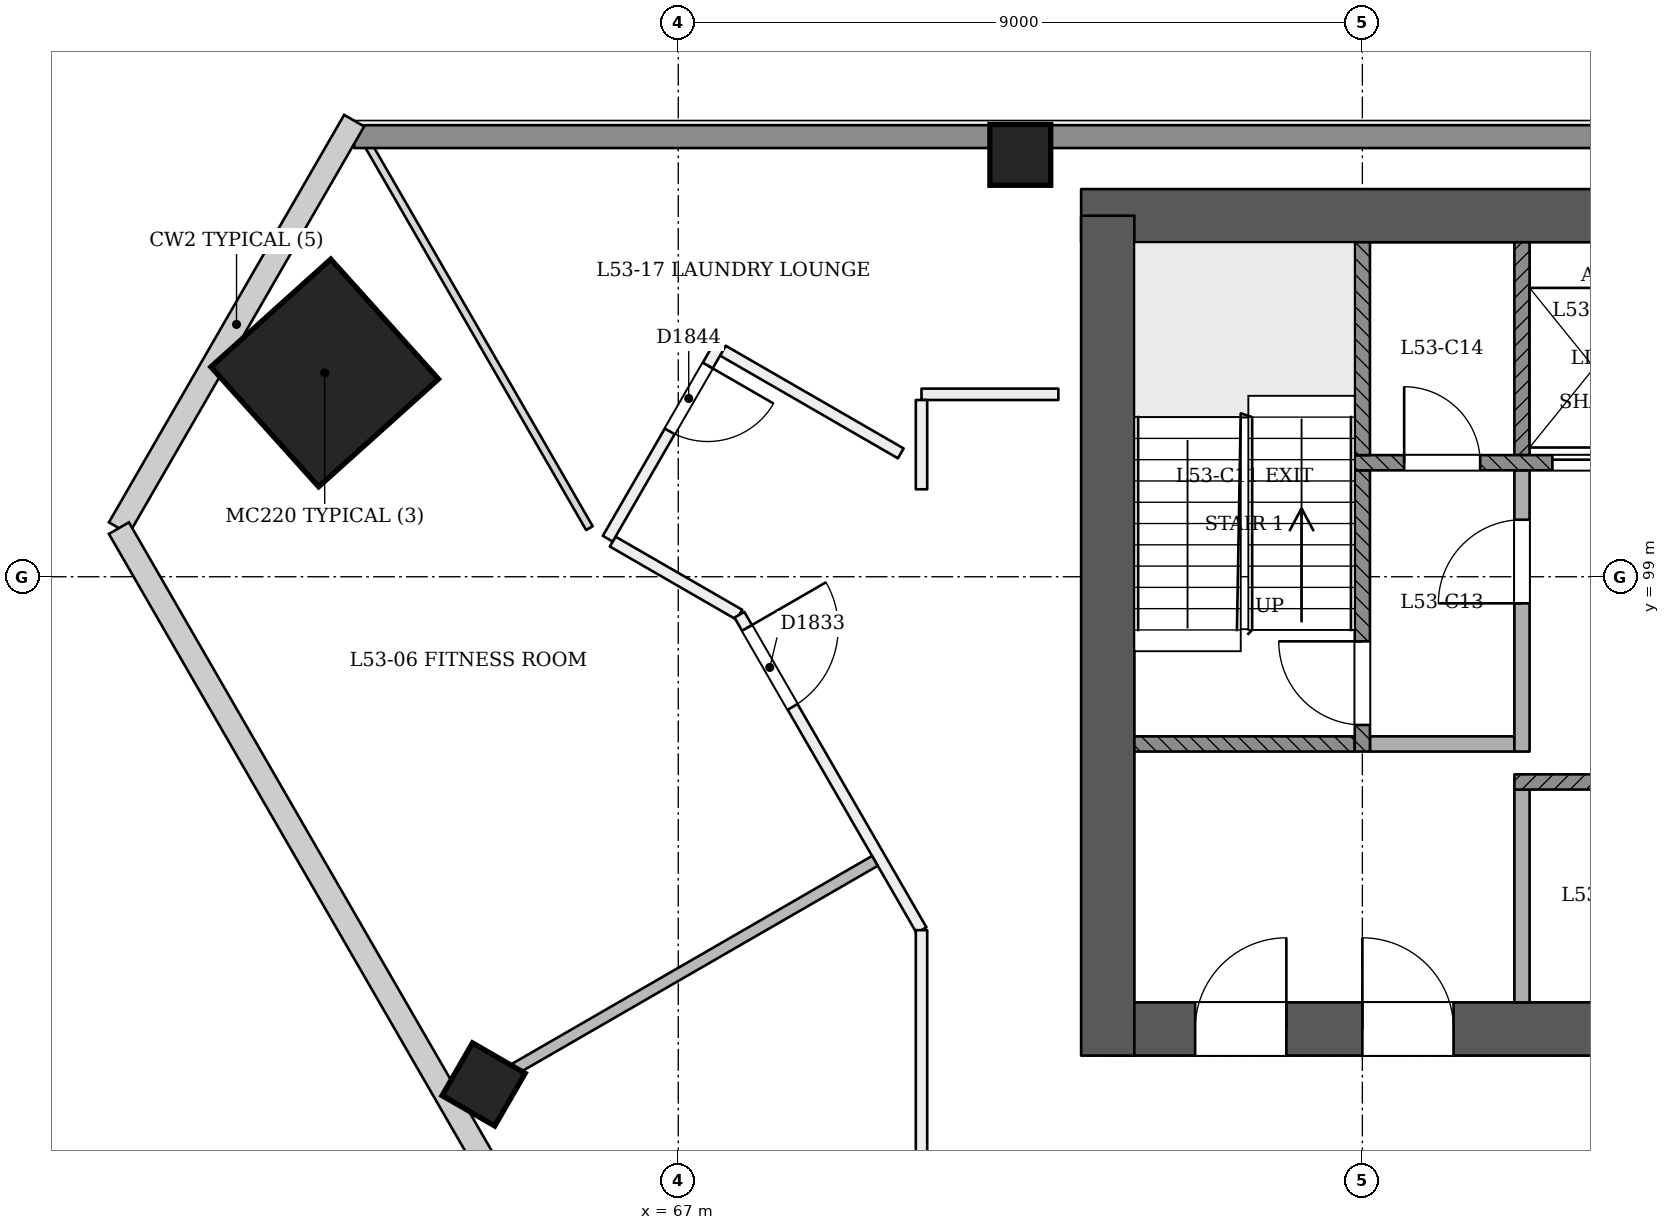
"""IFC4 building model, lengths in metres.
Left out: names, types, materials, properties, quantities, classifications, styles, units other than length and angle.
Written with IfcOpenShell. Run it as: python <this file> out.ifc"""

import sys

from ifc_helpers import new_model, si_unit, direction, frame, frame_2d, origin, origin_2d, place, context, subcontext, project, spatial, rectangle, extrude, element, fill, save


model = new_model("IFC4")
c1 = context("Model", 3, precision=1e-05, world=origin(), true_north=direction((0.0, 1.0)))
c2 = subcontext(c1, "Body", "Model", "MODEL_VIEW")
j1 = project(units=[si_unit("LENGTHUNIT", "METRE"), si_unit("PLANEANGLEUNIT", "RADIAN")], contexts=[c1])
p1 = place(None, origin())
s1 = spatial("IfcSite", under=j1, at=p1, CompositionType="ELEMENT")
p2 = place(p1, origin())
s2 = spatial("IfcBuilding", under=s1, at=p2, CompositionType="ELEMENT")
p3 = place(p2, frame((0.0, 0.0, 205.2)))
s3 = spatial("IfcBuildingStorey", under=s2, at=p3, CompositionType="ELEMENT", Elevation=205.2)
p4 = place(p3, frame((72.65, 93.05, 0.0), z_axis=(0.0, 0.0, 1.0), x_axis=(1.0, 0.0, 0.0)))
e1 = element("IfcWall", 1, at=p4, inside=s3, PredefinedType="SHEAR", context=c2, shape_type="SweptSolid", body=[
    extrude(rectangle(XDim=25.05, YDim=0.7, at=frame_2d((12.525, 0.0))), origin(), (0.0, 0.0, 1.0), 3.6),
])
p5 = place(p4, frame((1.15, 0.0, 0.0)))
e2 = element("IfcOpeningElement", 2, at=p5, cuts=e1, PredefinedType="OPENING", context=c2, shape_type="SweptSolid", body=[
    extrude(rectangle(XDim=1.2, YDim=2.1, at=frame_2d((0.6, 1.05))), frame((0.0, 0.36, 0.0), z_axis=(0.0, -1.0, 0.0), x_axis=(1.0, 0.0, 0.0)), (0.0, 0.0, 1.0), 0.721),
])
p6 = place(p4, frame((3.35, 0.0, 0.0)))
e3 = element("IfcOpeningElement", 3, at=p6, cuts=e1, PredefinedType="OPENING", context=c2, shape_type="SweptSolid", body=[
    extrude(rectangle(XDim=1.2, YDim=2.1, at=frame_2d((0.6, 1.05))), frame((0.0, 0.36, 0.0), z_axis=(0.0, -1.0, 0.0), x_axis=(1.0, 0.0, 0.0)), (0.0, 0.0, 1.0), 0.721),
])
p7 = place(p4, frame((13.35, 0.0, 0.0)))
e4 = element("IfcOpeningElement", 4, at=p7, cuts=e1, PredefinedType="OPENING", context=c2, shape_type="SweptSolid", body=[
    extrude(rectangle(XDim=1.2, YDim=2.1, at=frame_2d((0.6, 1.05))), frame((0.0, 0.36, 0.0), z_axis=(0.0, -1.0, 0.0), x_axis=(1.0, 0.0, 0.0)), (0.0, 0.0, 1.0), 0.721),
])
p8 = place(p4, frame((15.812, 0.0, 0.0)))
e5 = element("IfcOpeningElement", 5, at=p8, cuts=e1, PredefinedType="OPENING", context=c2, shape_type="SweptSolid", body=[
    extrude(rectangle(XDim=1.0, YDim=2.1, at=frame_2d((0.5, 1.05))), frame((0.0, 0.36, 0.0), z_axis=(0.0, -1.0, 0.0), x_axis=(1.0, 0.0, 0.0)), (0.0, 0.0, 1.0), 0.721),
])
p9 = place(p4, frame((18.25, 0.0, 0.0)))
e6 = element("IfcOpeningElement", 6, at=p9, cuts=e1, PredefinedType="OPENING", context=c2, shape_type="SweptSolid", body=[
    extrude(rectangle(XDim=1.0, YDim=2.1, at=frame_2d((0.5, 1.05))), frame((0.0, 0.36, 0.0), z_axis=(0.0, -1.0, 0.0), x_axis=(1.0, 0.0, 0.0)), (0.0, 0.0, 1.0), 0.721),
])
p10 = place(p4, frame((20.6, 0.0, 0.0)))
e7 = element("IfcOpeningElement", 7, at=p10, cuts=e1, PredefinedType="OPENING", context=c2, shape_type="SweptSolid", body=[
    extrude(rectangle(XDim=1.0, YDim=2.1, at=frame_2d((0.5, 1.05))), frame((0.0, 0.36, 0.0), z_axis=(0.0, -1.0, 0.0), x_axis=(1.0, 0.0, 0.0)), (0.0, 0.0, 1.0), 0.721),
])
p11 = place(p4, frame((22.887, 0.0, 0.0)))
e8 = element("IfcOpeningElement", 8, at=p11, cuts=e1, PredefinedType="OPENING", context=c2, shape_type="SweptSolid", body=[
    extrude(rectangle(XDim=1.0, YDim=2.1, at=frame_2d((0.5, 1.05))), frame((0.0, 0.36, 0.0), z_axis=(0.0, -1.0, 0.0), x_axis=(1.0, 0.0, 0.0)), (0.0, 0.0, 1.0), 0.721),
])
p12 = place(p3, frame((97.35, 103.75, 0.0), z_axis=(0.0, 0.0, 1.0), x_axis=(-1.0, 0.0, 0.0)))
e9 = element("IfcWall", 9, at=p12, inside=s3, PredefinedType="SHEAR", context=c2, shape_type="SweptSolid", body=[
    extrude(rectangle(XDim=25.05, YDim=0.7, at=frame_2d((12.525, 0.0))), origin(), (0.0, 0.0, 1.0), 3.6),
])
p13 = place(p3, frame((72.65, 103.75, 0.0), z_axis=(0.0, 0.0, 1.0), x_axis=(0.0, -1.0, 0.0)))
e10 = element("IfcWall", 10, at=p13, inside=s3, PredefinedType="SHEAR", context=c2, shape_type="SweptSolid", body=[
    extrude(rectangle(XDim=11.05, YDim=0.7, at=frame_2d((5.525, 0.0))), origin(), (0.0, 0.0, 1.0), 3.6),
])
p14 = place(p3, frame((62.314, 101.67, 0.0), z_axis=(0.028401814599, 0.009218727412, 0.999554076572), x_axis=(-0.865120088362, 0.501167477907, 0.019959754512)))
e11 = element("IfcColumn", 11, at=p14, inside=s3, PredefinedType="COLUMN", context=c2, shape_type="SweptSolid", body=[
    extrude(rectangle(XDim=2.12, YDim=2.12, at=origin_2d()), origin(), (0.0, 0.0, 1.0), 3.602),
])
p15 = place(p3, frame((71.5, 104.55, 0.0), z_axis=(0.0, 0.0, 1.0), x_axis=(1.0, 0.0, 0.0)))
e12 = element("IfcColumn", 12, at=p15, inside=s3, PredefinedType="COLUMN", context=c2, shape_type="SweptSolid", body=[
    extrude(rectangle(XDim=0.8, YDim=0.8, at=origin_2d()), origin(), (0.0, 0.0, 1.0), 3.6),
])
p16 = place(p3, frame((64.412, 92.273, -0.024), z_axis=(0.022222852987, 0.038483477124, 0.999012095419), x_axis=(-0.865636672078, -0.499191360046, 0.038485555846)))
e13 = element("IfcColumn", 13, at=p16, inside=s3, PredefinedType="COLUMN", context=c2, shape_type="SweptSolid", body=[
    extrude(rectangle(XDim=0.8, YDim=0.8, at=origin_2d()), origin(), (0.0, 0.0, 1.0), 3.604),
])
p17 = place(p3, frame((66.137, 99.462, 0.0), z_axis=(0.0, 0.0, 1.0), x_axis=(0.866033512162, -0.499985955615, 0.0)))
e14 = element("IfcWall", 14, at=p17, inside=s3, PredefinedType="PARTITIONING", context=c2, shape_type="SweptSolid", body=[
    extrude(rectangle(XDim=1.925, YDim=0.15, at=frame_2d((0.962, 0.0))), origin(), (0.0, 0.0, 1.0), 3.15),
])
p18 = place(p3, frame((67.804, 98.5, 0.0), z_axis=(0.0, 0.0, 1.0), x_axis=(0.499991496398, -0.866030313286, 0.0)))
e15 = element("IfcWall", 15, at=p18, inside=s3, PredefinedType="PARTITIONING", context=c2, shape_type="SweptSolid", body=[
    extrude(rectangle(XDim=4.792, YDim=0.15, at=frame_2d((2.396, 0.0))), origin(), (0.0, 0.0, 1.0), 3.15),
])
p19 = place(p18, frame((0.2, 0.0, 0.0)))
e16 = element("IfcOpeningElement", 16, at=p19, cuts=e15, PredefinedType="OPENING", context=c2, shape_type="SweptSolid", body=[
    extrude(rectangle(XDim=1.2, YDim=2.1, at=frame_2d((0.6, 1.05))), frame((0.0, 0.085, 0.0), z_axis=(0.0, -1.0, 0.0), x_axis=(1.0, 0.0, 0.0)), (0.0, 0.0, 1.0), 0.171),
])
p20 = place(p3, frame((70.2, 94.35, 0.0), z_axis=(0.0, 0.0, 1.0), x_axis=(0.0, -1.0, 0.0)))
e17 = element("IfcWall", 17, at=p20, inside=s3, PredefinedType="PARTITIONING", context=c2, shape_type="SweptSolid", body=[
    extrude(rectangle(XDim=4.15, YDim=0.15, at=frame_2d((2.075, 0.0))), origin(), (0.0, 0.0, 1.0), 3.15),
])
p21 = place(p3, frame((72.0, 101.4, 0.0), z_axis=(0.0, 0.0, 1.0), x_axis=(-1.0, 0.0, 0.0)))
e18 = element("IfcWall", 18, at=p21, inside=s3, PredefinedType="PARTITIONING", context=c2, shape_type="SweptSolid", body=[
    extrude(rectangle(XDim=1.8, YDim=0.15, at=frame_2d((0.9, 0.0))), origin(), (0.0, 0.0, 1.0), 3.15),
])
p22 = place(p3, frame((70.2, 101.325, 0.0), z_axis=(0.0, 0.0, 1.0), x_axis=(0.0, -1.0, 0.0)))
e19 = element("IfcWall", 19, at=p22, inside=s3, PredefinedType="PARTITIONING", context=c2, shape_type="SweptSolid", body=[
    extrude(rectangle(XDim=1.175, YDim=0.15, at=frame_2d((0.587, 0.0))), origin(), (0.0, 0.0, 1.0), 3.15),
])
p23 = place(p3, frame((69.927, 100.623, 0.0), z_axis=(0.0, 0.0, 1.0), x_axis=(-0.866060705498, 0.499938850654, 0.0)))
e20 = element("IfcWall", 20, at=p23, inside=s3, PredefinedType="PARTITIONING", context=c2, shape_type="SweptSolid", body=[
    extrude(rectangle(XDim=2.702, YDim=0.15, at=frame_2d((1.351, 0.0))), origin(), (0.0, 0.0, 1.0), 3.15),
])
p24 = place(p3, frame((67.522, 102.011, 0.0), z_axis=(0.0, 0.0, 1.0), x_axis=(-0.499987231761, -0.866032775405, 0.0)))
e21 = element("IfcWall", 21, at=p24, inside=s3, PredefinedType="PARTITIONING", context=c2, shape_type="SweptSolid", body=[
    extrude(rectangle(XDim=2.9, YDim=0.15, at=frame_2d((1.45, 0.0))), origin(), (0.0, 0.0, 1.0), 3.15),
])
p25 = place(p24, frame((0.269, 0.0, 0.0)))
e22 = element("IfcOpeningElement", 22, at=p25, cuts=e21, PredefinedType="OPENING", context=c2, shape_type="SweptSolid", body=[
    extrude(rectangle(XDim=1.0, YDim=2.1, at=frame_2d((0.5, 1.05))), frame((0.0, 0.085, 0.0), z_axis=(0.0, -1.0, 0.0), x_axis=(1.0, 0.0, 0.0)), (0.0, 0.0, 1.0), 0.171),
])
p26 = place(p3, frame((64.11, 92.099, 0.0), z_axis=(0.0, 0.0, 1.0), x_axis=(0.866015887322, 0.500016482634, 0.0)))
e23 = element("IfcWall", 23, at=p26, inside=s3, PredefinedType="PARTITIONING", context=c2, shape_type="SweptSolid", body=[
    extrude(rectangle(XDim=6.325, YDim=0.15, at=frame_2d((3.163, 0.0))), origin(), (0.0, 0.0, 1.0), 2.65),
])
p27 = place(p3, frame((65.831, 99.639, 0.0), z_axis=(0.0, 0.0, 1.0), x_axis=(-0.499994988479, 0.866028297168, 0.0)))
e24 = element("IfcWall", 24, at=p27, inside=s3, PredefinedType="PARTITIONING", context=c2, shape_type="SweptSolid", body=[
    extrude(rectangle(XDim=6.074, YDim=0.1, at=frame_2d((3.037, 0.0))), origin(), (0.0, 0.0, 1.0), 2.65),
])
p28 = place(p3, frame((62.736, 104.79, 0.0), z_axis=(0.0, 0.0, 1.0), x_axis=(1.0, 0.0, 0.0)))
e25 = element("IfcWall", 25, at=p28, inside=s3, PredefinedType="SOLIDWALL", context=c2, shape_type="SweptSolid", body=[
    extrude(rectangle(XDim=44.528, YDim=0.3, at=frame_2d((22.264, 0.0))), origin(), (0.0, 0.0, 1.0), 2.65),
])
p29 = place(p3, frame((78.1, 93.4, 0.0), z_axis=(0.0, 0.0, 1.0), x_axis=(0.0, 1.0, 0.0)))
e26 = element("IfcWall", 26, at=p29, inside=s3, PredefinedType="PARTITIONING", context=c2, shape_type="SweptSolid", body=[
    extrude(rectangle(XDim=2.8, YDim=0.2, at=frame_2d((1.4, 0.0))), origin(), (0.0, 0.0, 1.0), 3.15),
])
p30 = place(p3, frame((78.0, 96.3, 0.0), z_axis=(0.0, 0.0, 1.0), x_axis=(1.0, 0.0, 0.0)))
e27 = element("IfcWall", 27, at=p30, inside=s3, PredefinedType="SOLIDWALL", context=c2, shape_type="SweptSolid", body=[
    extrude(rectangle(XDim=7.8, YDim=0.2, at=frame_2d((3.9, 0.0))), origin(), (0.0, 0.0, 1.0), 3.15),
])
p31 = place(p30, frame((1.5, 0.0, 0.0)))
e28 = element("IfcOpeningElement", 28, at=p31, cuts=e27, PredefinedType="OPENING", context=c2, shape_type="SweptSolid", body=[
    extrude(rectangle(XDim=1.0, YDim=2.1, at=frame_2d((0.5, 1.05))), frame((0.0, 0.11, 0.0), z_axis=(0.0, -1.0, 0.0), x_axis=(1.0, 0.0, 0.0)), (0.0, 0.0, 1.0), 0.221),
])
p32 = place(p3, frame((73.0, 96.8, 0.0), z_axis=(0.0, 0.0, 1.0), x_axis=(1.0, 0.0, 0.0)))
e29 = element("IfcWall", 29, at=p32, inside=s3, PredefinedType="SOLIDWALL", context=c2, shape_type="SweptSolid", body=[
    extrude(rectangle(XDim=2.9, YDim=0.2, at=frame_2d((1.45, 0.0))), origin(), (0.0, 0.0, 1.0), 3.15),
])
p33 = place(p3, frame((76.0, 96.7, 0.0), z_axis=(0.0, 0.0, 1.0), x_axis=(0.0, 1.0, 0.0)))
e30 = element("IfcWall", 30, at=p33, inside=s3, PredefinedType="SOLIDWALL", context=c2, shape_type="SweptSolid", body=[
    extrude(rectangle(XDim=3.7, YDim=0.2, at=frame_2d((1.85, 0.0))), origin(), (0.0, 0.0, 1.0), 3.15),
])
p34 = place(p33, frame((0.35, 0.0, 0.0)))
e31 = element("IfcOpeningElement", 31, at=p34, cuts=e30, PredefinedType="OPENING", context=c2, shape_type="SweptSolid", body=[
    extrude(rectangle(XDim=1.1, YDim=2.1, at=frame_2d((0.55, 1.05))), frame((0.0, 0.11, 0.0), z_axis=(0.0, -1.0, 0.0), x_axis=(1.0, 0.0, 0.0)), (0.0, 0.0, 1.0), 0.221),
])
p35 = place(p3, frame((76.1, 96.8, 0.0), z_axis=(0.0, 0.0, 1.0), x_axis=(1.0, 0.0, 0.0)))
e32 = element("IfcWall", 32, at=p35, inside=s3, PredefinedType="PARTITIONING", context=c2, shape_type="SweptSolid", body=[
    extrude(rectangle(XDim=1.9, YDim=0.2, at=frame_2d((0.95, 0.0))), origin(), (0.0, 0.0, 1.0), 3.15),
])
p36 = place(p3, frame((78.1, 96.7, 0.0), z_axis=(0.0, 0.0, 1.0), x_axis=(0.0, 1.0, 0.0)))
e33 = element("IfcWall", 33, at=p36, inside=s3, PredefinedType="PARTITIONING", context=c2, shape_type="SweptSolid", body=[
    extrude(rectangle(XDim=3.7, YDim=0.2, at=frame_2d((1.85, 0.0))), origin(), (0.0, 0.0, 1.0), 3.15),
])
p37 = place(p36, frame((1.95, 0.0, 0.0)))
e34 = element("IfcOpeningElement", 34, at=p37, cuts=e33, PredefinedType="OPENING", context=c2, shape_type="SweptSolid", body=[
    extrude(rectangle(XDim=1.1, YDim=2.1, at=frame_2d((0.55, 1.05))), frame((0.0, 0.11, 0.0), z_axis=(0.0, -1.0, 0.0), x_axis=(1.0, 0.0, 0.0)), (0.0, 0.0, 1.0), 0.221),
])
p38 = place(p3, frame((75.9, 100.5, 0.0), z_axis=(0.0, 0.0, 1.0), x_axis=(1.0, 0.0, 0.0)))
e35 = element("IfcWall", 35, at=p38, inside=s3, PredefinedType="SOLIDWALL", context=c2, shape_type="SweptSolid", body=[
    extrude(rectangle(XDim=18.2, YDim=0.2, at=frame_2d((9.1, 0.0))), origin(), (0.0, 0.0, 1.0), 3.15),
])
p39 = place(p38, frame((2.6, 0.0, 0.0)))
e36 = element("IfcOpeningElement", 36, at=p39, cuts=e35, PredefinedType="OPENING", context=c2, shape_type="SweptSolid", body=[
    extrude(rectangle(XDim=1.1, YDim=2.1, at=frame_2d((0.55, 1.05))), frame((0.0, 0.11, 0.0), z_axis=(0.0, -1.0, 0.0), x_axis=(1.0, 0.0, 0.0)), (0.0, 0.0, 1.0), 0.221),
])
p40 = place(p38, frame((4.5, 0.0, 0.0)))
e37 = element("IfcOpeningElement", 37, at=p40, cuts=e35, PredefinedType="OPENING", context=c2, shape_type="SweptSolid", body=[
    extrude(rectangle(XDim=1.1, YDim=2.1, at=frame_2d((0.55, 1.05))), frame((0.0, 0.11, 0.0), z_axis=(0.0, -1.0, 0.0), x_axis=(1.0, 0.0, 0.0)), (0.0, 0.0, 1.0), 0.221),
])
p41 = place(p38, frame((6.4, 0.0, 0.0)))
e38 = element("IfcOpeningElement", 38, at=p41, cuts=e35, PredefinedType="OPENING", context=c2, shape_type="SweptSolid", body=[
    extrude(rectangle(XDim=1.1, YDim=2.1, at=frame_2d((0.55, 1.05))), frame((0.0, 0.11, 0.0), z_axis=(0.0, -1.0, 0.0), x_axis=(1.0, 0.0, 0.0)), (0.0, 0.0, 1.0), 0.221),
])
p42 = place(p38, frame((8.3, 0.0, 0.0)))
e39 = element("IfcOpeningElement", 39, at=p42, cuts=e35, PredefinedType="OPENING", context=c2, shape_type="SweptSolid", body=[
    extrude(rectangle(XDim=1.1, YDim=2.1, at=frame_2d((0.55, 1.05))), frame((0.0, 0.11, 0.0), z_axis=(0.0, -1.0, 0.0), x_axis=(1.0, 0.0, 0.0)), (0.0, 0.0, 1.0), 0.221),
])
p43 = place(p38, frame((10.2, 0.0, 0.0)))
e40 = element("IfcOpeningElement", 40, at=p43, cuts=e35, PredefinedType="OPENING", context=c2, shape_type="SweptSolid", body=[
    extrude(rectangle(XDim=1.1, YDim=2.1, at=frame_2d((0.55, 1.05))), frame((0.0, 0.11, 0.0), z_axis=(0.0, -1.0, 0.0), x_axis=(1.0, 0.0, 0.0)), (0.0, 0.0, 1.0), 0.221),
])
p44 = place(p38, frame((12.1, 0.0, 0.0)))
e41 = element("IfcOpeningElement", 41, at=p44, cuts=e35, PredefinedType="OPENING", context=c2, shape_type="SweptSolid", body=[
    extrude(rectangle(XDim=1.1, YDim=2.1, at=frame_2d((0.55, 1.05))), frame((0.0, 0.11, 0.0), z_axis=(0.0, -1.0, 0.0), x_axis=(1.0, 0.0, 0.0)), (0.0, 0.0, 1.0), 0.221),
])
p45 = place(p38, frame((14.0, 0.0, 0.0)))
e42 = element("IfcOpeningElement", 42, at=p45, cuts=e35, PredefinedType="OPENING", context=c2, shape_type="SweptSolid", body=[
    extrude(rectangle(XDim=1.1, YDim=2.1, at=frame_2d((0.55, 1.05))), frame((0.0, 0.11, 0.0), z_axis=(0.0, -1.0, 0.0), x_axis=(1.0, 0.0, 0.0)), (0.0, 0.0, 1.0), 0.221),
])
p46 = place(p38, frame((0.65, 0.0, 0.0)))
e43 = element("IfcOpeningElement", 43, at=p46, cuts=e35, PredefinedType="OPENING", context=c2, shape_type="SweptSolid", body=[
    extrude(rectangle(XDim=1.0, YDim=2.1, at=frame_2d((0.5, 1.05))), frame((0.0, 0.11, 0.0), z_axis=(0.0, -1.0, 0.0), x_axis=(1.0, 0.0, 0.0)), (0.0, 0.0, 1.0), 0.221),
])
p47 = place(p38, frame((16.3, 0.0, 0.0)))
e44 = element("IfcOpeningElement", 44, at=p47, cuts=e35, PredefinedType="OPENING", context=c2, shape_type="SweptSolid", body=[
    extrude(rectangle(XDim=1.0, YDim=2.1, at=frame_2d((0.5, 1.05))), frame((0.0, 0.11, 0.0), z_axis=(0.0, -1.0, 0.0), x_axis=(1.0, 0.0, 0.0)), (0.0, 0.0, 1.0), 0.221),
])
for number, where, z_axis, x_axis in (
    (45, (76.0, 100.6, 0.0), (0.0, 0.0, 1.0), (0.0, 1.0, 0.0)),
    (46, (78.1, 100.6, 0.0), (0.0, 0.0, 1.0), (0.0, 1.0, 0.0)),
):
    element("IfcWall", number, at=place(p3, frame(where, z_axis=z_axis, x_axis=x_axis)), inside=s3, PredefinedType="SOLIDWALL", context=c2, shape_type="SweptSolid", body=[
        extrude(rectangle(XDim=2.8, YDim=0.2, at=frame_2d((1.4, 0.0))), origin(), (0.0, 0.0, 1.0), 3.15),
    ])
p48 = place(p19, origin())
e47 = element("IfcDoor", 47, at=p48, inside=s3, OperationType="SINGLE_SWING_LEFT", PredefinedType="NOTDEFINED", context=c2, shape_type="SweptSolid", body=[
    extrude(rectangle(XDim=1.2, YDim=2.1, at=frame_2d((0.6, 1.05))), frame((0.0, 0.025, 0.0), z_axis=(0.0, -1.0, 0.0), x_axis=(1.0, 0.0, 0.0)), (0.0, 0.0, 1.0), 0.05),
])
fill(e16, e47)
p49 = place(p25, origin())
e48 = element("IfcDoor", 48, at=p49, inside=s3, OperationType="SINGLE_SWING_LEFT", PredefinedType="NOTDEFINED", context=c2, shape_type="SweptSolid", body=[
    extrude(rectangle(XDim=1.0, YDim=2.1, at=frame_2d((0.5, 1.05))), frame((0.0, 0.025, 0.0), z_axis=(0.0, -1.0, 0.0), x_axis=(1.0, 0.0, 0.0)), (0.0, 0.0, 1.0), 0.05),
])
fill(e22, e48)
p50 = place(p39, origin())
e49 = element("IfcDoor", 49, at=p50, inside=s3, OperationType="SLIDING_TO_RIGHT", PredefinedType="NOTDEFINED", context=c2, shape_type="SweptSolid", body=[
    extrude(rectangle(XDim=1.1, YDim=2.1, at=frame_2d((0.55, 1.05))), frame((0.0, 0.025, 0.0), z_axis=(0.0, -1.0, 0.0), x_axis=(1.0, 0.0, 0.0)), (0.0, 0.0, 1.0), 0.05),
])
fill(e36, e49)
p51 = place(p34, origin())
e50 = element("IfcDoor", 50, at=p51, inside=s3, OperationType="SINGLE_SWING_RIGHT", PredefinedType="NOTDEFINED", context=c2, shape_type="SweptSolid", body=[
    extrude(rectangle(XDim=1.1, YDim=2.1, at=frame_2d((0.55, 1.05))), frame((0.0, 0.025, 0.0), z_axis=(0.0, -1.0, 0.0), x_axis=(1.0, 0.0, 0.0)), (0.0, 0.0, 1.0), 0.05),
])
fill(e31, e50)
p52 = place(p37, origin())
e51 = element("IfcDoor", 51, at=p52, inside=s3, OperationType="SINGLE_SWING_LEFT", PredefinedType="NOTDEFINED", context=c2, shape_type="SweptSolid", body=[
    extrude(rectangle(XDim=1.1, YDim=2.1, at=frame_2d((0.55, 1.05))), frame((0.0, 0.025, 0.0), z_axis=(0.0, -1.0, 0.0), x_axis=(1.0, 0.0, 0.0)), (0.0, 0.0, 1.0), 0.05),
])
fill(e34, e51)
p53 = place(p5, origin())
e52 = element("IfcDoor", 52, at=p53, inside=s3, OperationType="SINGLE_SWING_RIGHT", PredefinedType="NOTDEFINED", context=c2, shape_type="SweptSolid", body=[
    extrude(rectangle(XDim=1.2, YDim=2.1, at=frame_2d((0.6, 1.05))), frame((0.0, 0.025, 0.0), z_axis=(0.0, -1.0, 0.0), x_axis=(1.0, 0.0, 0.0)), (0.0, 0.0, 1.0), 0.05),
])
fill(e2, e52)
p54 = place(p6, origin())
e53 = element("IfcDoor", 53, at=p54, inside=s3, OperationType="SINGLE_SWING_LEFT", PredefinedType="NOTDEFINED", context=c2, shape_type="SweptSolid", body=[
    extrude(rectangle(XDim=1.2, YDim=2.1, at=frame_2d((0.6, 1.05))), frame((0.0, 0.025, 0.0), z_axis=(0.0, -1.0, 0.0), x_axis=(1.0, 0.0, 0.0)), (0.0, 0.0, 1.0), 0.05),
])
fill(e3, e53)
p55 = place(p46, origin())
e54 = element("IfcDoor", 54, at=p55, inside=s3, OperationType="SINGLE_SWING_LEFT", PredefinedType="NOTDEFINED", context=c2, shape_type="SweptSolid", body=[
    extrude(rectangle(XDim=1.0, YDim=2.1, at=frame_2d((0.5, 1.05))), frame((0.0, 0.025, 0.0), z_axis=(0.0, -1.0, 0.0), x_axis=(1.0, 0.0, 0.0)), (0.0, 0.0, 1.0), 0.05),
])
fill(e43, e54)
save(model, sys.argv[1])
